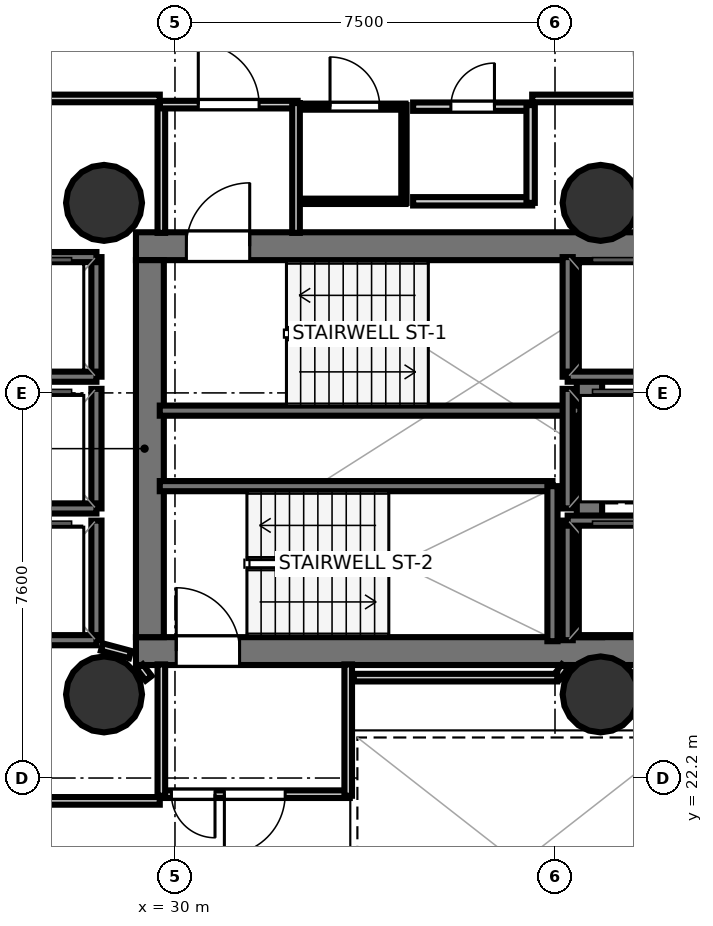
"""IFC4 building model, lengths in metres.
Left out: names, types, materials, properties, quantities, classifications, styles, units other than length and angle.
Written with IfcOpenShell. Run it as: python <this file> out.ifc"""

import sys

from ifc_helpers import new_model, si_unit, direction, frame, frame_2d, origin, origin_2d, place, context, subcontext, project, spatial, rectangle, hollow_circle, extrude, element, fill, save


model = new_model("IFC4")
c1 = context("Model", 3, precision=1e-05, world=origin(), true_north=direction((0.0, 1.0)))
c2 = subcontext(c1, "Body", "Model", "MODEL_VIEW")
j1 = project(units=[si_unit("LENGTHUNIT", "METRE"), si_unit("PLANEANGLEUNIT", "RADIAN")], contexts=[c1])
p1 = place(None, origin())
s1 = spatial("IfcSite", under=j1, at=p1, CompositionType="ELEMENT")
p2 = place(p1, origin())
s2 = spatial("IfcBuilding", under=s1, at=p2, CompositionType="ELEMENT")
p3 = place(p2, frame((0.0, 0.0, 101.5)))
s3 = spatial("IfcBuildingStorey", under=s2, at=p3, CompositionType="ELEMENT", Elevation=101.5)
p4 = place(p3, frame((29.23, 32.695, 0.0), z_axis=(0.0, 0.0, 1.0), x_axis=(1.0, 0.0, 0.0)))
e1 = element("IfcWall", 1, at=p4, inside=s3, PredefinedType="SHEAR", context=c2, shape_type="SweptSolid", body=[
    extrude(rectangle(XDim=10.62, YDim=0.55, at=frame_2d((5.31, 0.0))), origin(), (0.0, 0.0, 1.0), 3.52),
])
p5 = place(p4, frame((0.995, 0.0, 0.0)))
e2 = element("IfcOpeningElement", 2, at=p5, cuts=e1, PredefinedType="OPENING", context=c2, shape_type="SweptSolid", body=[
    extrude(rectangle(XDim=1.25, YDim=2.15, at=frame_2d((0.625, 1.075))), frame((0.0, 0.285, 0.0), z_axis=(0.0, -1.0, 0.0), x_axis=(1.0, 0.0, 0.0)), (0.0, 0.0, 1.0), 0.57),
])
p6 = place(p3, frame((29.23, 24.705, 0.0), z_axis=(0.0, 0.0, 1.0), x_axis=(1.0, 0.0, 0.0)))
e3 = element("IfcWall", 3, at=p6, inside=s3, PredefinedType="SHEAR", context=c2, shape_type="SweptSolid", body=[
    extrude(rectangle(XDim=10.62, YDim=0.55, at=frame_2d((5.31, 0.0))), origin(), (0.0, 0.0, 1.0), 3.52),
])
p7 = place(p6, frame((0.795, 0.0, 0.0)))
e4 = element("IfcOpeningElement", 4, at=p7, cuts=e3, PredefinedType="OPENING", context=c2, shape_type="SweptSolid", body=[
    extrude(rectangle(XDim=1.25, YDim=2.15, at=frame_2d((0.625, 1.075))), frame((0.0, 0.285, 0.0), z_axis=(0.0, -1.0, 0.0), x_axis=(1.0, 0.0, 0.0)), (0.0, 0.0, 1.0), 0.57),
])
p8 = place(p3, frame((29.505, 24.98, 0.0), z_axis=(0.0, 0.0, 1.0), x_axis=(0.0, 1.0, 0.0)))
e5 = element("IfcWall", 5, at=p8, inside=s3, PredefinedType="SHEAR", context=c2, shape_type="SweptSolid", body=[
    extrude(rectangle(XDim=7.44, YDim=0.55, at=frame_2d((3.72, 0.0))), origin(), (0.0, 0.0, 1.0), 3.52),
])
p9 = place(p3, frame((38.18, 24.98, 0.0), z_axis=(0.0, 0.0, 1.0), x_axis=(0.0, 1.0, 0.0)))
e6 = element("IfcWall", 6, at=p9, inside=s3, PredefinedType="SHEAR", context=c2, shape_type="SweptSolid", body=[
    extrude(rectangle(XDim=7.44, YDim=0.5, at=frame_2d((3.72, 0.0))), origin(), (0.0, 0.0, 1.0), 3.52),
])
for number, where, z_axis, x_axis in (
    (7, (28.6, 33.55, 0.0), (0.0, 0.0, 1.0), (1.0, 0.0, 0.0)),
    (8, (28.6, 23.85, 0.0), (0.0, 0.0, 1.0), (1.0, 0.0, 0.0)),
    (9, (38.4, 33.55, 0.0), (0.0, 0.0, 1.0), (1.0, 0.0, 0.0)),
    (10, (38.4, 23.85, 0.0), (0.0, 0.0, 1.0), (1.0, 0.0, 0.0)),
):
    element("IfcColumn", number, at=place(p3, frame(where, z_axis=z_axis, x_axis=x_axis)), inside=s3, PredefinedType="COLUMN", context=c2, shape_type="SweptSolid", body=[
        extrude(hollow_circle(Radius=0.75, WallThickness=0.036, at=origin_2d()), origin(), (0.0, 0.0, 1.0), 3.7),
    ])
p10 = place(p3, frame((29.7, 29.45, 0.0), z_axis=(0.0, 0.0, 1.0), x_axis=(1.0, 0.0, 0.0)))
e11 = element("IfcWall", 11, at=p10, inside=s3, PredefinedType="SOLIDWALL", context=c2, shape_type="SweptSolid", body=[
    extrude(rectangle(XDim=8.3, YDim=0.2, at=frame_2d((4.15, 0.0))), origin(), (0.0, 0.0, 1.0), 3.52),
])
p11 = place(p3, frame((29.7, 27.96, 0.0), z_axis=(0.0, 0.0, 1.0), x_axis=(1.0, 0.0, 0.0)))
e12 = element("IfcWall", 12, at=p11, inside=s3, PredefinedType="SOLIDWALL", context=c2, shape_type="SweptSolid", body=[
    extrude(rectangle(XDim=7.75, YDim=0.2, at=frame_2d((3.875, 0.0))), origin(), (0.0, 0.0, 1.0), 3.52),
])
p12 = place(p3, frame((37.45, 24.9, 0.0), z_axis=(0.0, 0.0, 1.0), x_axis=(0.0, 1.0, 0.0)))
e13 = element("IfcWall", 13, at=p12, inside=s3, PredefinedType="SOLIDWALL", context=c2, shape_type="SweptSolid", body=[
    extrude(rectangle(XDim=3.06, YDim=0.2, at=frame_2d((1.53, 0.0))), origin(), (0.0, 0.0, 1.0), 3.52),
])
p13 = place(p3, frame((37.75, 30.12, 0.0), z_axis=(0.0, 0.0, 1.0), x_axis=(0.0, 1.0, 0.0)))
e14 = element("IfcWall", 14, at=p13, inside=s3, PredefinedType="SOLIDWALL", context=c2, shape_type="SweptSolid", body=[
    extrude(rectangle(XDim=2.36, YDim=0.2, at=frame_2d((1.18, 0.0))), origin(), (0.0, 0.0, 1.0), 3.52),
])
p14 = place(p3, frame((37.75, 30.12, 0.0), z_axis=(0.0, 0.0, 1.0), x_axis=(1.0, 0.0, 0.0)))
e15 = element("IfcWall", 15, at=p14, inside=s3, PredefinedType="SOLIDWALL", context=c2, shape_type="SweptSolid", body=[
    extrude(rectangle(XDim=2.1, YDim=0.2, at=frame_2d((1.05, 0.0))), origin(), (0.0, 0.0, 1.0), 3.52),
])
p15 = place(p3, frame((37.75, 24.92, 0.0), z_axis=(0.0, 0.0, 1.0), x_axis=(0.0, 1.0, 0.0)))
e16 = element("IfcWall", 16, at=p15, inside=s3, PredefinedType="SOLIDWALL", context=c2, shape_type="SweptSolid", body=[
    extrude(rectangle(XDim=2.36, YDim=0.2, at=frame_2d((1.18, 0.0))), origin(), (0.0, 0.0, 1.0), 3.52),
])
p16 = place(p3, frame((37.75, 27.28, 0.0), z_axis=(0.0, 0.0, 1.0), x_axis=(1.0, 0.0, 0.0)))
e17 = element("IfcWall", 17, at=p16, inside=s3, PredefinedType="SOLIDWALL", context=c2, shape_type="SweptSolid", body=[
    extrude(rectangle(XDim=2.1, YDim=0.2, at=frame_2d((1.05, 0.0))), origin(), (0.0, 0.0, 1.0), 3.52),
])
p17 = place(p3, frame((28.45, 30.12, 0.0), z_axis=(0.0, 0.0, 1.0), x_axis=(0.0, 1.0, 0.0)))
e18 = element("IfcWall", 18, at=p17, inside=s3, PredefinedType="SOLIDWALL", context=c2, shape_type="SweptSolid", body=[
    extrude(rectangle(XDim=2.36, YDim=0.2, at=frame_2d((1.18, 0.0))), origin(), (0.0, 0.0, 1.0), 3.52),
])
for number, where, z_axis, x_axis in (
    (19, (26.35, 32.48, 0.0), (0.0, 0.0, 1.0), (1.0, 0.0, 0.0)),
    (20, (26.35, 30.12, 0.0), (0.0, 0.0, 1.0), (1.0, 0.0, 0.0)),
):
    element("IfcWall", number, at=place(p3, frame(where, z_axis=z_axis, x_axis=x_axis)), inside=s3, PredefinedType="SOLIDWALL", context=c2, shape_type="SweptSolid", body=[
        extrude(rectangle(XDim=2.1, YDim=0.2, at=frame_2d((1.05, 0.0))), origin(), (0.0, 0.0, 1.0), 3.52),
    ])
p18 = place(p3, frame((28.45, 27.52, 0.0), z_axis=(0.0, 0.0, 1.0), x_axis=(0.0, 1.0, 0.0)))
e21 = element("IfcWall", 21, at=p18, inside=s3, PredefinedType="SOLIDWALL", context=c2, shape_type="SweptSolid", body=[
    extrude(rectangle(XDim=2.36, YDim=0.2, at=frame_2d((1.18, 0.0))), origin(), (0.0, 0.0, 1.0), 3.52),
])
p19 = place(p3, frame((26.35, 27.52, 0.0), z_axis=(0.0, 0.0, 1.0), x_axis=(1.0, 0.0, 0.0)))
e22 = element("IfcWall", 22, at=p19, inside=s3, PredefinedType="SOLIDWALL", context=c2, shape_type="SweptSolid", body=[
    extrude(rectangle(XDim=2.1, YDim=0.2, at=frame_2d((1.05, 0.0))), origin(), (0.0, 0.0, 1.0), 3.52),
])
p20 = place(p3, frame((28.45, 24.92, 0.0), z_axis=(0.0, 0.0, 1.0), x_axis=(0.0, 1.0, 0.0)))
e23 = element("IfcWall", 23, at=p20, inside=s3, PredefinedType="SOLIDWALL", context=c2, shape_type="SweptSolid", body=[
    extrude(rectangle(XDim=2.36, YDim=0.2, at=frame_2d((1.18, 0.0))), origin(), (0.0, 0.0, 1.0), 3.52),
])
p21 = place(p3, frame((26.35, 24.92, 0.0), z_axis=(0.0, 0.0, 1.0), x_axis=(1.0, 0.0, 0.0)))
e24 = element("IfcWall", 24, at=p21, inside=s3, PredefinedType="SOLIDWALL", context=c2, shape_type="SweptSolid", body=[
    extrude(rectangle(XDim=2.1, YDim=0.2, at=frame_2d((1.05, 0.0))), origin(), (0.0, 0.0, 1.0), 3.52),
])
p22 = place(p3, frame((37.75, 27.52, 0.0), z_axis=(0.0, 0.0, 1.0), x_axis=(0.0, 1.0, 0.0)))
e25 = element("IfcWall", 25, at=p22, inside=s3, PredefinedType="SOLIDWALL", context=c2, shape_type="SweptSolid", body=[
    extrude(rectangle(XDim=2.36, YDim=0.2, at=frame_2d((1.18, 0.0))), origin(), (0.0, 0.0, 1.0), 3.52),
])
p23 = place(p3, frame((29.731, 32.958, 0.0), z_axis=(0.0, 0.0, 1.0), x_axis=(0.0, 1.0, 0.0)))
e26 = element("IfcWall", 26, at=p23, inside=s3, PredefinedType="PARTITIONING", context=c2, shape_type="SweptSolid", body=[
    extrude(rectangle(XDim=2.562, YDim=0.15, at=frame_2d((1.281, 0.0))), origin(), (0.0, 0.0, 1.0), 2.84),
])
p24 = place(p3, frame((29.7, 35.489, 0.0), z_axis=(0.0, 0.0, 1.0), x_axis=(1.0, 0.0, 0.0)))
e27 = element("IfcWall", 27, at=p24, inside=s3, PredefinedType="PARTITIONING", context=c2, shape_type="SweptSolid", body=[
    extrude(rectangle(XDim=2.72, YDim=0.15, at=frame_2d((1.36, 0.0))), origin(), (0.0, 0.0, 1.0), 2.84),
])
p25 = place(p24, frame((0.76, 0.0, 0.0)))
e28 = element("IfcOpeningElement", 28, at=p25, cuts=e27, PredefinedType="OPENING", context=c2, shape_type="SweptSolid", body=[
    extrude(rectangle(XDim=1.2, YDim=2.15, at=frame_2d((0.6, 1.075))), frame((0.0, 0.085, 0.0), z_axis=(0.0, -1.0, 0.0), x_axis=(1.0, 0.0, 0.0)), (0.0, 0.0, 1.0), 0.17),
])
p26 = place(p3, frame((32.389, 35.52, 0.0), z_axis=(0.0, 0.0, 1.0), x_axis=(0.0, -1.0, 0.0)))
e29 = element("IfcWall", 29, at=p26, inside=s3, PredefinedType="PARTITIONING", context=c2, shape_type="SweptSolid", body=[
    extrude(rectangle(XDim=2.562, YDim=0.15, at=frame_2d((1.281, 0.0))), origin(), (0.0, 0.0, 1.0), 2.84),
])
p27 = place(p3, frame((33.45, 21.881, 0.0), z_axis=(0.0, 0.0, 1.0), x_axis=(-1.0, 0.0, 0.0)))
e30 = element("IfcWall", 30, at=p27, inside=s3, PredefinedType="PARTITIONING", context=c2, shape_type="SweptSolid", body=[
    extrude(rectangle(XDim=3.75, YDim=0.15, at=frame_2d((1.875, 0.0))), origin(), (0.0, 0.0, 1.0), 2.84),
])
p28 = place(p27, frame((1.275, 0.0, 0.0)))
e31 = element("IfcOpeningElement", 31, at=p28, cuts=e30, PredefinedType="OPENING", context=c2, shape_type="SweptSolid", body=[
    extrude(rectangle(XDim=1.2, YDim=2.15, at=frame_2d((0.6, 1.075))), frame((0.0, 0.085, 0.0), z_axis=(0.0, -1.0, 0.0), x_axis=(1.0, 0.0, 0.0)), (0.0, 0.0, 1.0), 0.17),
])
p29 = place(p27, frame((2.66, 0.0, 0.0)))
e32 = element("IfcOpeningElement", 32, at=p29, cuts=e30, PredefinedType="OPENING", context=c2, shape_type="SweptSolid", body=[
    extrude(rectangle(XDim=0.86, YDim=2.05, at=frame_2d((0.43, 1.025))), frame((0.0, 0.085, 0.0), z_axis=(0.0, -1.0, 0.0), x_axis=(1.0, 0.0, 0.0)), (0.0, 0.0, 1.0), 0.17),
])
for number, where, z_axis, x_axis in (
    (33, (29.731, 21.85, 0.0), (0.0, 0.0, 1.0), (0.0, 1.0, 0.0)),
    (34, (33.419, 24.442, 0.0), (0.0, 0.0, 1.0), (0.0, -1.0, 0.0)),
):
    element("IfcWall", number, at=place(p3, frame(where, z_axis=z_axis, x_axis=x_axis)), inside=s3, PredefinedType="PARTITIONING", context=c2, shape_type="SweptSolid", body=[
        extrude(rectangle(XDim=2.592, YDim=0.15, at=frame_2d((1.296, 0.0))), origin(), (0.0, 0.0, 1.0), 2.84),
    ])
p30 = place(p3, frame((34.55, 33.581, 0.0), z_axis=(0.0, 0.0, 1.0), x_axis=(-1.0, 0.0, 0.0)))
e35 = element("IfcWall", 35, at=p30, inside=s3, PredefinedType="PARTITIONING", context=c2, shape_type="SweptSolid", body=[
    extrude(rectangle(XDim=2.0, YDim=0.105, at=frame_2d((1.0, 0.0))), origin(), (0.0, 0.0, 1.0), 2.84),
])
p31 = place(p3, frame((32.55, 35.449, 0.0), z_axis=(0.0, 0.0, 1.0), x_axis=(1.0, 0.0, 0.0)))
e36 = element("IfcWall", 36, at=p31, inside=s3, PredefinedType="PARTITIONING", context=c2, shape_type="SweptSolid", body=[
    extrude(rectangle(XDim=2.0, YDim=0.12, at=frame_2d((1.0, 0.0))), origin(), (0.0, 0.0, 1.0), 2.84),
])
p32 = place(p31, frame((0.51, 0.0, 0.0)))
e37 = element("IfcOpeningElement", 37, at=p32, cuts=e36, PredefinedType="OPENING", context=c2, shape_type="SweptSolid", body=[
    extrude(rectangle(XDim=0.98, YDim=2.1, at=frame_2d((0.49, 1.05))), frame((0.0, 0.07, 0.0), z_axis=(0.0, -1.0, 0.0), x_axis=(1.0, 0.0, 0.0)), (0.0, 0.0, 1.0), 0.14),
])
p33 = place(p3, frame((34.519, 35.48, 0.0), z_axis=(0.0, 0.0, 1.0), x_axis=(0.0, -1.0, 0.0)))
e38 = element("IfcWall", 38, at=p33, inside=s3, PredefinedType="PARTITIONING", context=c2, shape_type="SweptSolid", body=[
    extrude(rectangle(XDim=1.93, YDim=0.105, at=frame_2d((0.965, 0.0))), origin(), (0.0, 0.0, 1.0), 2.84),
])
p34 = place(p3, frame((37.05, 33.581, 0.0), z_axis=(0.0, 0.0, 1.0), x_axis=(-1.0, 0.0, 0.0)))
e39 = element("IfcWall", 39, at=p34, inside=s3, PredefinedType="PLUMBINGWALL", context=c2, shape_type="SweptSolid", body=[
    extrude(rectangle(XDim=2.35, YDim=0.165, at=frame_2d((1.175, 0.0))), origin(), (0.0, 0.0, 1.0), 2.84),
])
p35 = place(p3, frame((34.7, 35.449, 0.0), z_axis=(0.0, 0.0, 1.0), x_axis=(1.0, 0.0, 0.0)))
e40 = element("IfcWall", 40, at=p35, inside=s3, PredefinedType="PLUMBINGWALL", context=c2, shape_type="SweptSolid", body=[
    extrude(rectangle(XDim=2.35, YDim=0.165, at=frame_2d((1.175, 0.0))), origin(), (0.0, 0.0, 1.0), 2.84),
])
p36 = place(p35, frame((0.745, 0.0, 0.0)))
e41 = element("IfcOpeningElement", 41, at=p36, cuts=e40, PredefinedType="OPENING", context=c2, shape_type="SweptSolid", body=[
    extrude(rectangle(XDim=0.86, YDim=2.05, at=frame_2d((0.43, 1.025))), frame((0.0, 0.093, 0.0), z_axis=(0.0, -1.0, 0.0), x_axis=(1.0, 0.0, 0.0)), (0.0, 0.0, 1.0), 0.185),
])
p37 = place(p3, frame((37.019, 35.48, 0.0), z_axis=(0.0, 0.0, 1.0), x_axis=(0.0, -1.0, 0.0)))
e42 = element("IfcWall", 42, at=p37, inside=s3, PredefinedType="PLUMBINGWALL", context=c2, shape_type="SweptSolid", body=[
    extrude(rectangle(XDim=1.93, YDim=0.165, at=frame_2d((0.965, 0.0))), origin(), (0.0, 0.0, 1.0), 2.84),
])
p38 = place(p3, frame((29.48, 24.169, 0.0), z_axis=(0.0, 0.0, 1.0), x_axis=(-0.608043045279, 0.79390405912, 0.0)))
e43 = element("IfcWall", 43, at=p38, inside=s3, PredefinedType="PARTITIONING", context=c2, shape_type="SweptSolid", body=[
    extrude(rectangle(XDim=0.29, YDim=0.15, at=frame_2d((0.145, 0.0))), origin(), (0.0, 0.0, 1.0), 2.84),
])
p39 = place(p3, frame((29.114, 24.637, 0.0), z_axis=(0.0, 0.0, 1.0), x_axis=(-0.966199685486, 0.257794817183, 0.0)))
e44 = element("IfcWall", 44, at=p39, inside=s3, PredefinedType="PARTITIONING", context=c2, shape_type="SweptSolid", body=[
    extrude(rectangle(XDim=0.575, YDim=0.15, at=frame_2d((0.288, 0.0))), origin(), (0.0, 0.0, 1.0), 2.84),
])
p40 = place(p3, frame((37.697, 24.399, 0.0), z_axis=(0.0, 0.0, 1.0), x_axis=(-0.60763139403, -0.794219169367, 0.0)))
e45 = element("IfcWall", 45, at=p40, inside=s3, PredefinedType="PARTITIONING", context=c2, shape_type="SweptSolid", body=[
    extrude(rectangle(XDim=0.25, YDim=0.15, at=frame_2d((0.125, 0.0))), origin(), (0.0, 0.0, 1.0), 2.84),
])
p41 = place(p3, frame((37.545, 24.181, 0.0), z_axis=(0.0, 0.0, 1.0), x_axis=(-1.0, 0.0, 0.0)))
e46 = element("IfcWall", 46, at=p41, inside=s3, PredefinedType="PARTITIONING", context=c2, shape_type="SweptSolid", body=[
    extrude(rectangle(XDim=4.015, YDim=0.15, at=frame_2d((2.007, 0.0))), origin(), (0.0, 0.0, 1.0), 2.84),
])
p42 = place(p3, frame((39.818, 35.611, 0.0), z_axis=(0.0, 0.0, 1.0), x_axis=(-1.0, 0.0, 0.0)))
e47 = element("IfcWall", 47, at=p42, inside=s3, PredefinedType="PARTITIONING", context=c2, shape_type="SweptSolid", body=[
    extrude(rectangle(XDim=2.768, YDim=0.15, at=frame_2d((1.384, 0.0))), origin(), (0.0, 0.0, 1.0), 2.84),
])
for number, where, z_axis, x_axis in (
    (48, (29.7, 35.611, 0.0), (0.0, 0.0, 1.0), (-1.0, 0.0, 0.0)),
    (49, (26.42, 21.749, 0.0), (0.0, 0.0, 1.0), (1.0, 0.0, 0.0)),
):
    element("IfcWall", number, at=place(p3, frame(where, z_axis=z_axis, x_axis=x_axis)), inside=s3, PredefinedType="PARTITIONING", context=c2, shape_type="SweptSolid", body=[
        extrude(rectangle(XDim=3.28, YDim=0.15, at=frame_2d((1.64, 0.0))), origin(), (0.0, 0.0, 1.0), 2.84),
    ])
p43 = place(p5, origin())
e50 = element("IfcDoor", 50, at=p43, inside=s3, OperationType="SINGLE_SWING_RIGHT", PredefinedType="DOOR", context=c2, shape_type="SweptSolid", body=[
    extrude(rectangle(XDim=1.25, YDim=2.15, at=frame_2d((0.625, 1.075))), frame((0.0, 0.025, 0.0), z_axis=(0.0, -1.0, 0.0), x_axis=(1.0, 0.0, 0.0)), (0.0, 0.0, 1.0), 0.05),
])
fill(e2, e50)
p44 = place(p7, origin())
e51 = element("IfcDoor", 51, at=p44, inside=s3, OperationType="SINGLE_SWING_LEFT", PredefinedType="DOOR", context=c2, shape_type="SweptSolid", body=[
    extrude(rectangle(XDim=1.25, YDim=2.15, at=frame_2d((0.625, 1.075))), frame((0.0, 0.025, 0.0), z_axis=(0.0, -1.0, 0.0), x_axis=(1.0, 0.0, 0.0)), (0.0, 0.0, 1.0), 0.05),
])
fill(e4, e51)
p45 = place(p25, origin())
e52 = element("IfcDoor", 52, at=p45, inside=s3, OperationType="SINGLE_SWING_LEFT", PredefinedType="DOOR", context=c2, shape_type="SweptSolid", body=[
    extrude(rectangle(XDim=1.2, YDim=2.15, at=frame_2d((0.6, 1.075))), frame((0.0, 0.025, 0.0), z_axis=(0.0, -1.0, 0.0), x_axis=(1.0, 0.0, 0.0)), (0.0, 0.0, 1.0), 0.05),
])
fill(e28, e52)
p46 = place(p28, origin())
e53 = element("IfcDoor", 53, at=p46, inside=s3, OperationType="SINGLE_SWING_RIGHT", PredefinedType="DOOR", context=c2, shape_type="SweptSolid", body=[
    extrude(rectangle(XDim=1.2, YDim=2.15, at=frame_2d((0.6, 1.075))), frame((0.0, 0.025, 0.0), z_axis=(0.0, -1.0, 0.0), x_axis=(1.0, 0.0, 0.0)), (0.0, 0.0, 1.0), 0.05),
])
fill(e31, e53)
p47 = place(p32, origin())
e54 = element("IfcDoor", 54, at=p47, inside=s3, OperationType="SINGLE_SWING_LEFT", PredefinedType="DOOR", context=c2, shape_type="SweptSolid", body=[
    extrude(rectangle(XDim=0.98, YDim=2.1, at=frame_2d((0.49, 1.05))), frame((0.0, 0.025, 0.0), z_axis=(0.0, -1.0, 0.0), x_axis=(1.0, 0.0, 0.0)), (0.0, 0.0, 1.0), 0.05),
])
fill(e37, e54)
p48 = place(p36, origin())
e55 = element("IfcDoor", 55, at=p48, inside=s3, OperationType="SINGLE_SWING_RIGHT", PredefinedType="DOOR", context=c2, shape_type="SweptSolid", body=[
    extrude(rectangle(XDim=0.86, YDim=2.05, at=frame_2d((0.43, 1.025))), frame((0.0, 0.025, 0.0), z_axis=(0.0, -1.0, 0.0), x_axis=(1.0, 0.0, 0.0)), (0.0, 0.0, 1.0), 0.05),
])
fill(e41, e55)
p49 = place(p29, origin())
e56 = element("IfcDoor", 56, at=p49, inside=s3, OperationType="SINGLE_SWING_LEFT", PredefinedType="DOOR", context=c2, shape_type="SweptSolid", body=[
    extrude(rectangle(XDim=0.86, YDim=2.05, at=frame_2d((0.43, 1.025))), frame((0.0, 0.025, 0.0), z_axis=(0.0, -1.0, 0.0), x_axis=(1.0, 0.0, 0.0)), (0.0, 0.0, 1.0), 0.05),
])
fill(e32, e56)
save(model, sys.argv[1])
